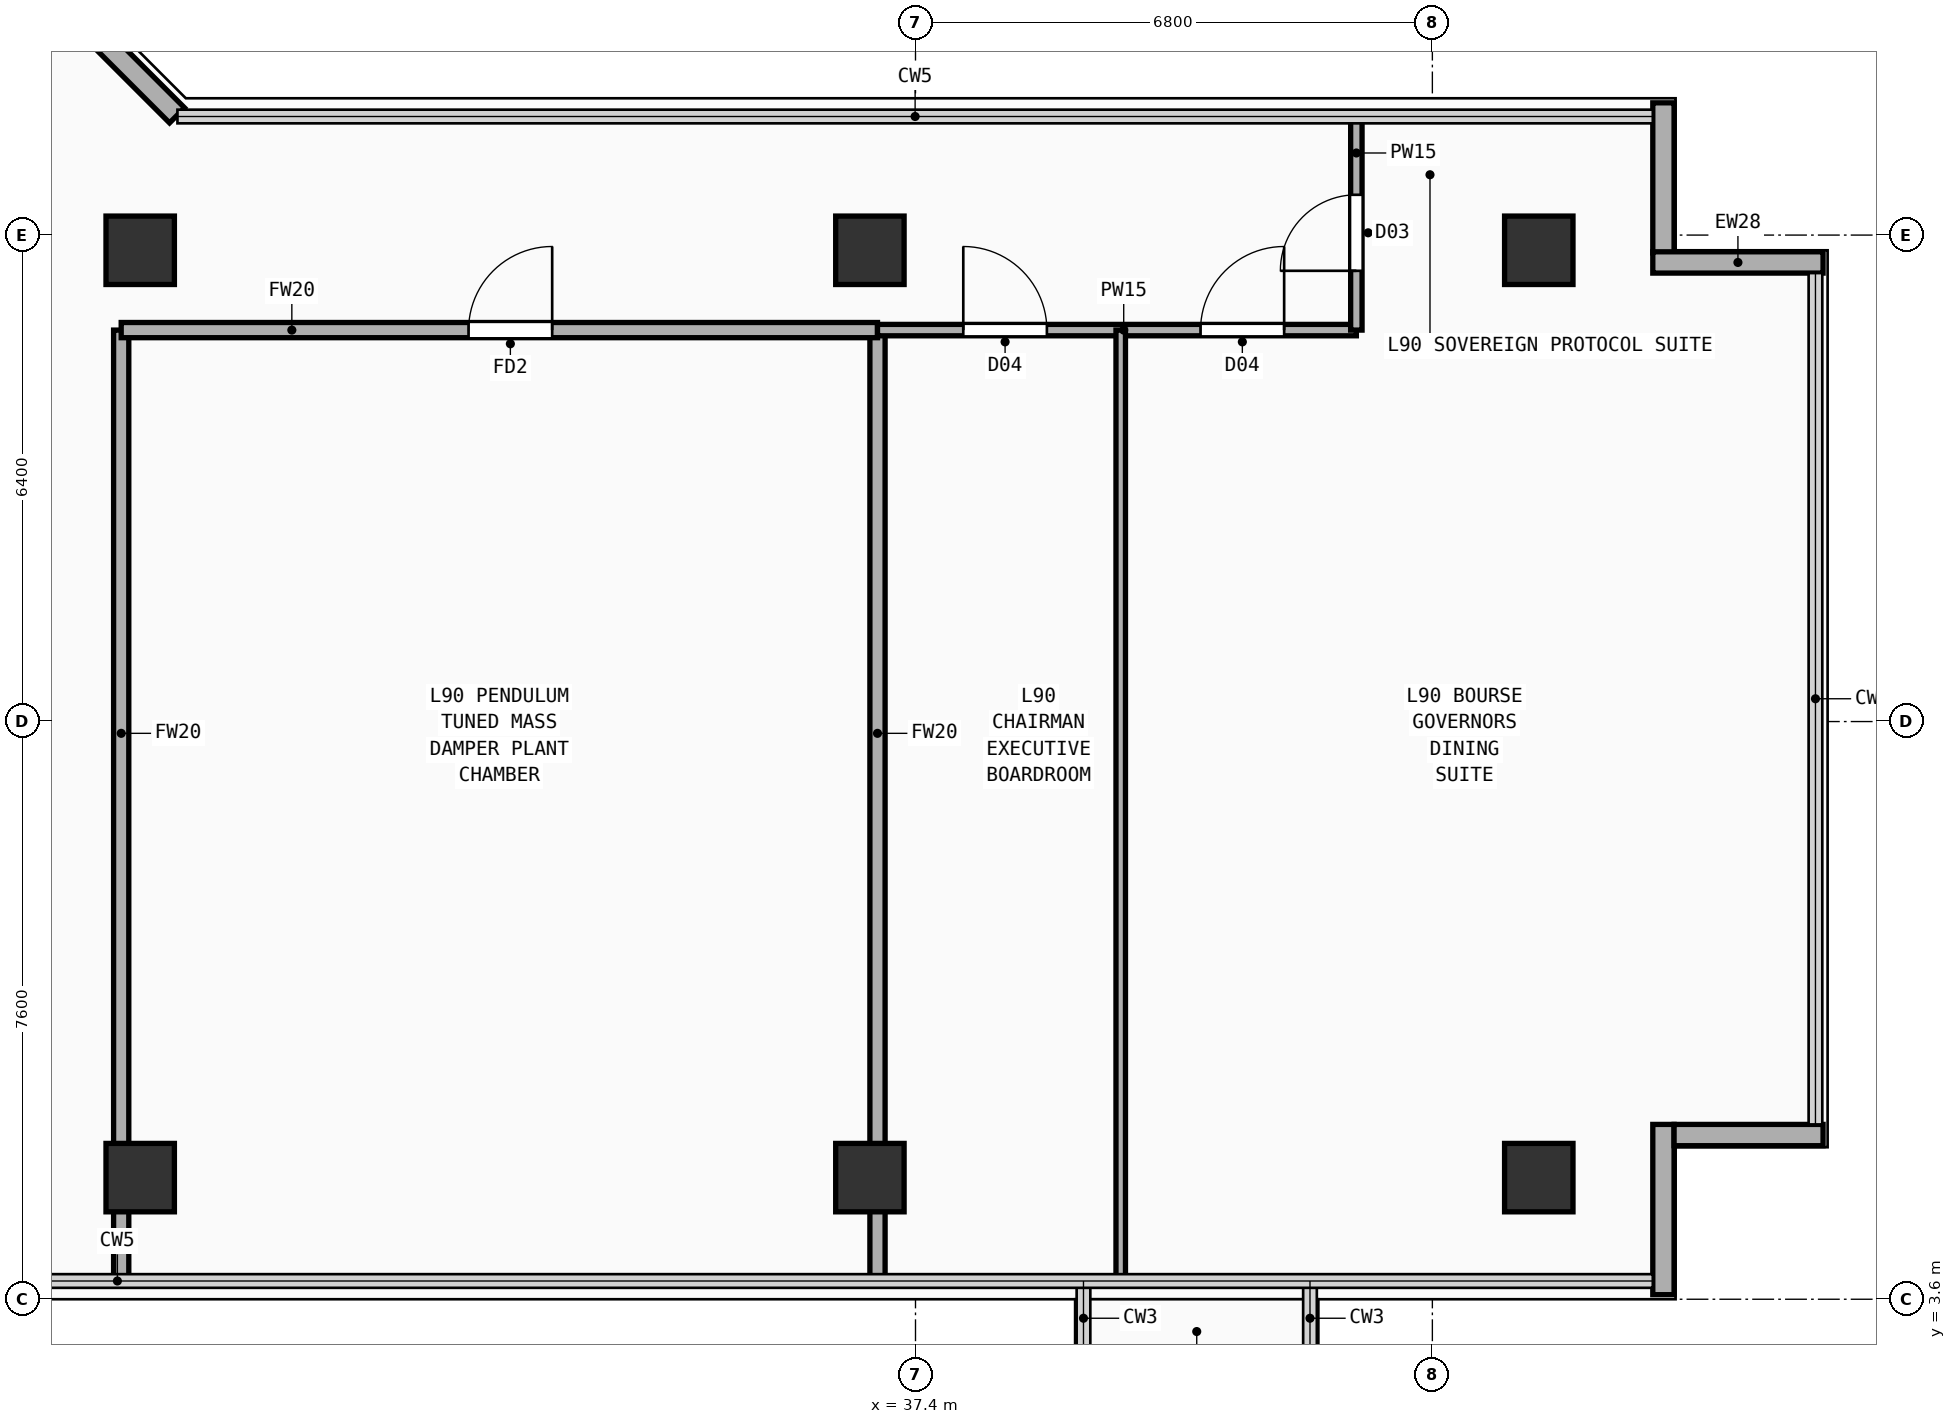
"""IFC4 building model, lengths in metres.
Left out: names, types, materials, properties, quantities, classifications, styles, units other than length and angle.
Written with IfcOpenShell. Run it as: python <this file> out.ifc"""

import sys

from ifc_helpers import new_model, si_unit, direction, frame, frame_2d, origin, origin_2d, place, context, subcontext, project, spatial, rectangle, extrude, element, fill, save


model = new_model("IFC4")
c1 = context("Model", 3, precision=1e-05, world=origin(), true_north=direction((0.0, 1.0)))
c2 = subcontext(c1, "Body", "Model", "MODEL_VIEW")
j1 = project(units=[si_unit("LENGTHUNIT", "METRE"), si_unit("PLANEANGLEUNIT", "RADIAN")], contexts=[c1])
p1 = place(None, origin())
s1 = spatial("IfcSite", under=j1, at=p1, CompositionType="ELEMENT")
p2 = place(p1, origin())
s2 = spatial("IfcBuilding", under=s1, at=p2, CompositionType="ELEMENT")
p3 = place(p2, frame((0.0, 0.0, 352.0)))
s3 = spatial("IfcBuildingStorey", under=s2, at=p3, CompositionType="ELEMENT", Elevation=352.0)
for number, where, z_axis, x_axis in (
    (1, (27.2, 5.2, 0.0), (0.0, 0.0, 1.0), (1.0, 0.0, 0.0)),
    (2, (36.8, 5.2, 0.0), (0.0, 0.0, 1.0), (1.0, 0.0, 0.0)),
    (3, (45.6, 5.2, 0.0), (0.0, 0.0, 1.0), (1.0, 0.0, 0.0)),
    (4, (27.2, 17.4, 0.0), (0.0, 0.0, 1.0), (1.0, 0.0, 0.0)),
    (5, (36.8, 17.4, 0.0), (0.0, 0.0, 1.0), (1.0, 0.0, 0.0)),
    (6, (45.6, 17.4, 0.0), (0.0, 0.0, 1.0), (1.0, 0.0, 0.0)),
):
    element("IfcColumn", number, at=place(p3, frame(where, z_axis=z_axis, x_axis=x_axis)), inside=s3, PredefinedType="COLUMN", context=c2, shape_type="SweptSolid", body=[
        extrude(rectangle(XDim=0.9, YDim=0.9, at=origin_2d()), origin(), (0.0, 0.0, 1.0), 3.82),
    ])
p4 = place(p3, frame((47.24, 3.66, 0.0), z_axis=(0.0, 0.0, 1.0), x_axis=(0.0, 1.0, 0.0)))
e7 = element("IfcWall", 7, at=p4, inside=s3, PredefinedType="SOLIDWALL", context=c2, shape_type="SweptSolid", body=[
    extrude(rectangle(XDim=2.24, YDim=0.28, at=frame_2d((1.12, 0.0))), origin(), (0.0, 0.0, 1.0), 3.82),
])
p5 = place(p3, frame((47.38, 5.76, 0.0), z_axis=(0.0, 0.0, 1.0), x_axis=(1.0, 0.0, 0.0)))
e8 = element("IfcWall", 8, at=p5, inside=s3, PredefinedType="SOLIDWALL", context=c2, shape_type="SweptSolid", body=[
    extrude(rectangle(XDim=1.96, YDim=0.28, at=frame_2d((0.98, 0.0))), origin(), (0.0, 0.0, 1.0), 3.82),
])
p6 = place(p3, frame((47.24, 17.365, 0.0), z_axis=(0.0, 0.0, 1.0), x_axis=(0.0, 1.0, 0.0)))
e9 = element("IfcWall", 9, at=p6, inside=s3, PredefinedType="SOLIDWALL", context=c2, shape_type="SweptSolid", body=[
    extrude(rectangle(XDim=1.975, YDim=0.28, at=frame_2d((0.988, 0.0))), origin(), (0.0, 0.0, 1.0), 3.82),
])
p7 = place(p3, frame((47.1, 17.24, 0.0), z_axis=(0.0, 0.0, 1.0), x_axis=(1.0, 0.0, 0.0)))
e10 = element("IfcWall", 10, at=p7, inside=s3, PredefinedType="SOLIDWALL", context=c2, shape_type="SweptSolid", body=[
    extrude(rectangle(XDim=2.24, YDim=0.28, at=frame_2d((1.12, 0.0))), origin(), (0.0, 0.0, 1.0), 3.82),
])
p8 = place(p3, frame((27.685, 19.175, 0.0), z_axis=(0.0, 0.0, 1.0), x_axis=(-0.707106781187, 0.707106781187, 0.0)))
e11 = element("IfcWall", 11, at=p8, inside=s3, PredefinedType="SOLIDWALL", context=c2, shape_type="SweptSolid", body=[
    extrude(rectangle(XDim=9.207, YDim=0.28, at=frame_2d((4.603, 0.0))), origin(), (0.0, 0.0, 1.0), 3.82),
])
for number, where, z_axis, x_axis in (
    (12, (26.95, 3.85, 0.0), (0.0, 0.0, 1.0), (0.0, 1.0, 0.0)),
    (13, (36.9, 3.85, 0.0), (0.0, 0.0, 1.0), (0.0, 1.0, 0.0)),
):
    element("IfcWall", number, at=place(p3, frame(where, z_axis=z_axis, x_axis=x_axis)), inside=s3, PredefinedType="PARTITIONING", context=c2, shape_type="SweptSolid", body=[
        extrude(rectangle(XDim=12.5, YDim=0.2, at=frame_2d((6.25, 0.0))), origin(), (0.0, 0.0, 1.0), 3.22),
    ])
p9 = place(p3, frame((26.95, 16.35, 0.0), z_axis=(0.0, 0.0, 1.0), x_axis=(1.0, 0.0, 0.0)))
e14 = element("IfcWall", 14, at=p9, inside=s3, PredefinedType="PARTITIONING", context=c2, shape_type="SweptSolid", body=[
    extrude(rectangle(XDim=9.95, YDim=0.2, at=frame_2d((4.975, 0.0))), origin(), (0.0, 0.0, 1.0), 3.82),
])
p10 = place(p9, frame((4.57, 0.0, 0.0)))
e15 = element("IfcOpeningElement", 15, at=p10, cuts=e14, PredefinedType="OPENING", context=c2, shape_type="SweptSolid", body=[
    extrude(rectangle(XDim=1.1, YDim=2.2, at=frame_2d((0.55, 1.1))), frame((0.0, 0.11, 0.0), z_axis=(0.0, -1.0, 0.0), x_axis=(1.0, 0.0, 0.0)), (0.0, 0.0, 1.0), 0.22),
])
p11 = place(p3, frame((36.9, 16.35, 0.0), z_axis=(0.0, 0.0, 1.0), x_axis=(1.0, 0.0, 0.0)))
e16 = element("IfcWall", 16, at=p11, inside=s3, PredefinedType="PARTITIONING", context=c2, shape_type="SweptSolid", body=[
    extrude(rectangle(XDim=6.3, YDim=0.15, at=frame_2d((3.15, 0.0))), origin(), (0.0, 0.0, 1.0), 3.82),
])
p12 = place(p11, frame((1.129, 0.0, 0.0)))
e17 = element("IfcOpeningElement", 17, at=p12, cuts=e16, PredefinedType="OPENING", context=c2, shape_type="SweptSolid", body=[
    extrude(rectangle(XDim=1.1, YDim=2.2, at=frame_2d((0.55, 1.1))), frame((0.0, 0.085, 0.0), z_axis=(0.0, -1.0, 0.0), x_axis=(1.0, 0.0, 0.0)), (0.0, 0.0, 1.0), 0.17),
])
p13 = place(p11, frame((4.25, 0.0, 0.0)))
e18 = element("IfcOpeningElement", 18, at=p13, cuts=e16, PredefinedType="OPENING", context=c2, shape_type="SweptSolid", body=[
    extrude(rectangle(XDim=1.1, YDim=2.2, at=frame_2d((0.55, 1.1))), frame((0.0, 0.085, 0.0), z_axis=(0.0, -1.0, 0.0), x_axis=(1.0, 0.0, 0.0)), (0.0, 0.0, 1.0), 0.17),
])
p14 = place(p3, frame((43.2, 16.35, 0.0), z_axis=(0.0, 0.0, 1.0), x_axis=(0.0, 1.0, 0.0)))
e19 = element("IfcWall", 19, at=p14, inside=s3, PredefinedType="PARTITIONING", context=c2, shape_type="SweptSolid", body=[
    extrude(rectangle(XDim=2.8, YDim=0.15, at=frame_2d((1.4, 0.0))), origin(), (0.0, 0.0, 1.0), 3.82),
])
p15 = place(p14, frame((0.78, 0.0, 0.0)))
e20 = element("IfcOpeningElement", 20, at=p15, cuts=e19, PredefinedType="OPENING", context=c2, shape_type="SweptSolid", body=[
    extrude(rectangle(XDim=1.0, YDim=2.2, at=frame_2d((0.5, 1.1))), frame((0.0, 0.085, 0.0), z_axis=(0.0, -1.0, 0.0), x_axis=(1.0, 0.0, 0.0)), (0.0, 0.0, 1.0), 0.17),
])
p16 = place(p3, frame((40.1, 3.85, 0.0), z_axis=(0.0, 0.0, 1.0), x_axis=(0.0, 1.0, 0.0)))
e21 = element("IfcWall", 21, at=p16, inside=s3, PredefinedType="PARTITIONING", context=c2, shape_type="SweptSolid", body=[
    extrude(rectangle(XDim=12.5, YDim=0.125, at=frame_2d((6.25, 0.0))), origin(), (0.0, 0.0, 1.0), 3.82),
])
p17 = place(p10, origin())
e22 = element("IfcDoor", 22, at=p17, inside=s3, OperationType="SINGLE_SWING_RIGHT", PredefinedType="DOOR", context=c2, shape_type="SweptSolid", body=[
    extrude(rectangle(XDim=1.1, YDim=2.2, at=frame_2d((0.55, 1.1))), frame((0.0, 0.025, 0.0), z_axis=(0.0, -1.0, 0.0), x_axis=(1.0, 0.0, 0.0)), (0.0, 0.0, 1.0), 0.05),
])
fill(e15, e22)
p18 = place(p12, origin())
e23 = element("IfcDoor", 23, at=p18, inside=s3, OperationType="SINGLE_SWING_LEFT", PredefinedType="DOOR", context=c2, shape_type="SweptSolid", body=[
    extrude(rectangle(XDim=1.1, YDim=2.2, at=frame_2d((0.55, 1.1))), frame((0.0, 0.025, 0.0), z_axis=(0.0, -1.0, 0.0), x_axis=(1.0, 0.0, 0.0)), (0.0, 0.0, 1.0), 0.05),
])
fill(e17, e23)
p19 = place(p13, origin())
e24 = element("IfcDoor", 24, at=p19, inside=s3, OperationType="SINGLE_SWING_RIGHT", PredefinedType="DOOR", context=c2, shape_type="SweptSolid", body=[
    extrude(rectangle(XDim=1.1, YDim=2.2, at=frame_2d((0.55, 1.1))), frame((0.0, 0.025, 0.0), z_axis=(0.0, -1.0, 0.0), x_axis=(1.0, 0.0, 0.0)), (0.0, 0.0, 1.0), 0.05),
])
fill(e18, e24)
p20 = place(p15, origin())
e25 = element("IfcDoor", 25, at=p20, inside=s3, OperationType="SINGLE_SWING_LEFT", PredefinedType="DOOR", context=c2, shape_type="SweptSolid", body=[
    extrude(rectangle(XDim=1.0, YDim=2.2, at=frame_2d((0.5, 1.1))), frame((0.0, 0.025, 0.0), z_axis=(0.0, -1.0, 0.0), x_axis=(1.0, 0.0, 0.0)), (0.0, 0.0, 1.0), 0.05),
])
fill(e20, e25)
save(model, sys.argv[1])
